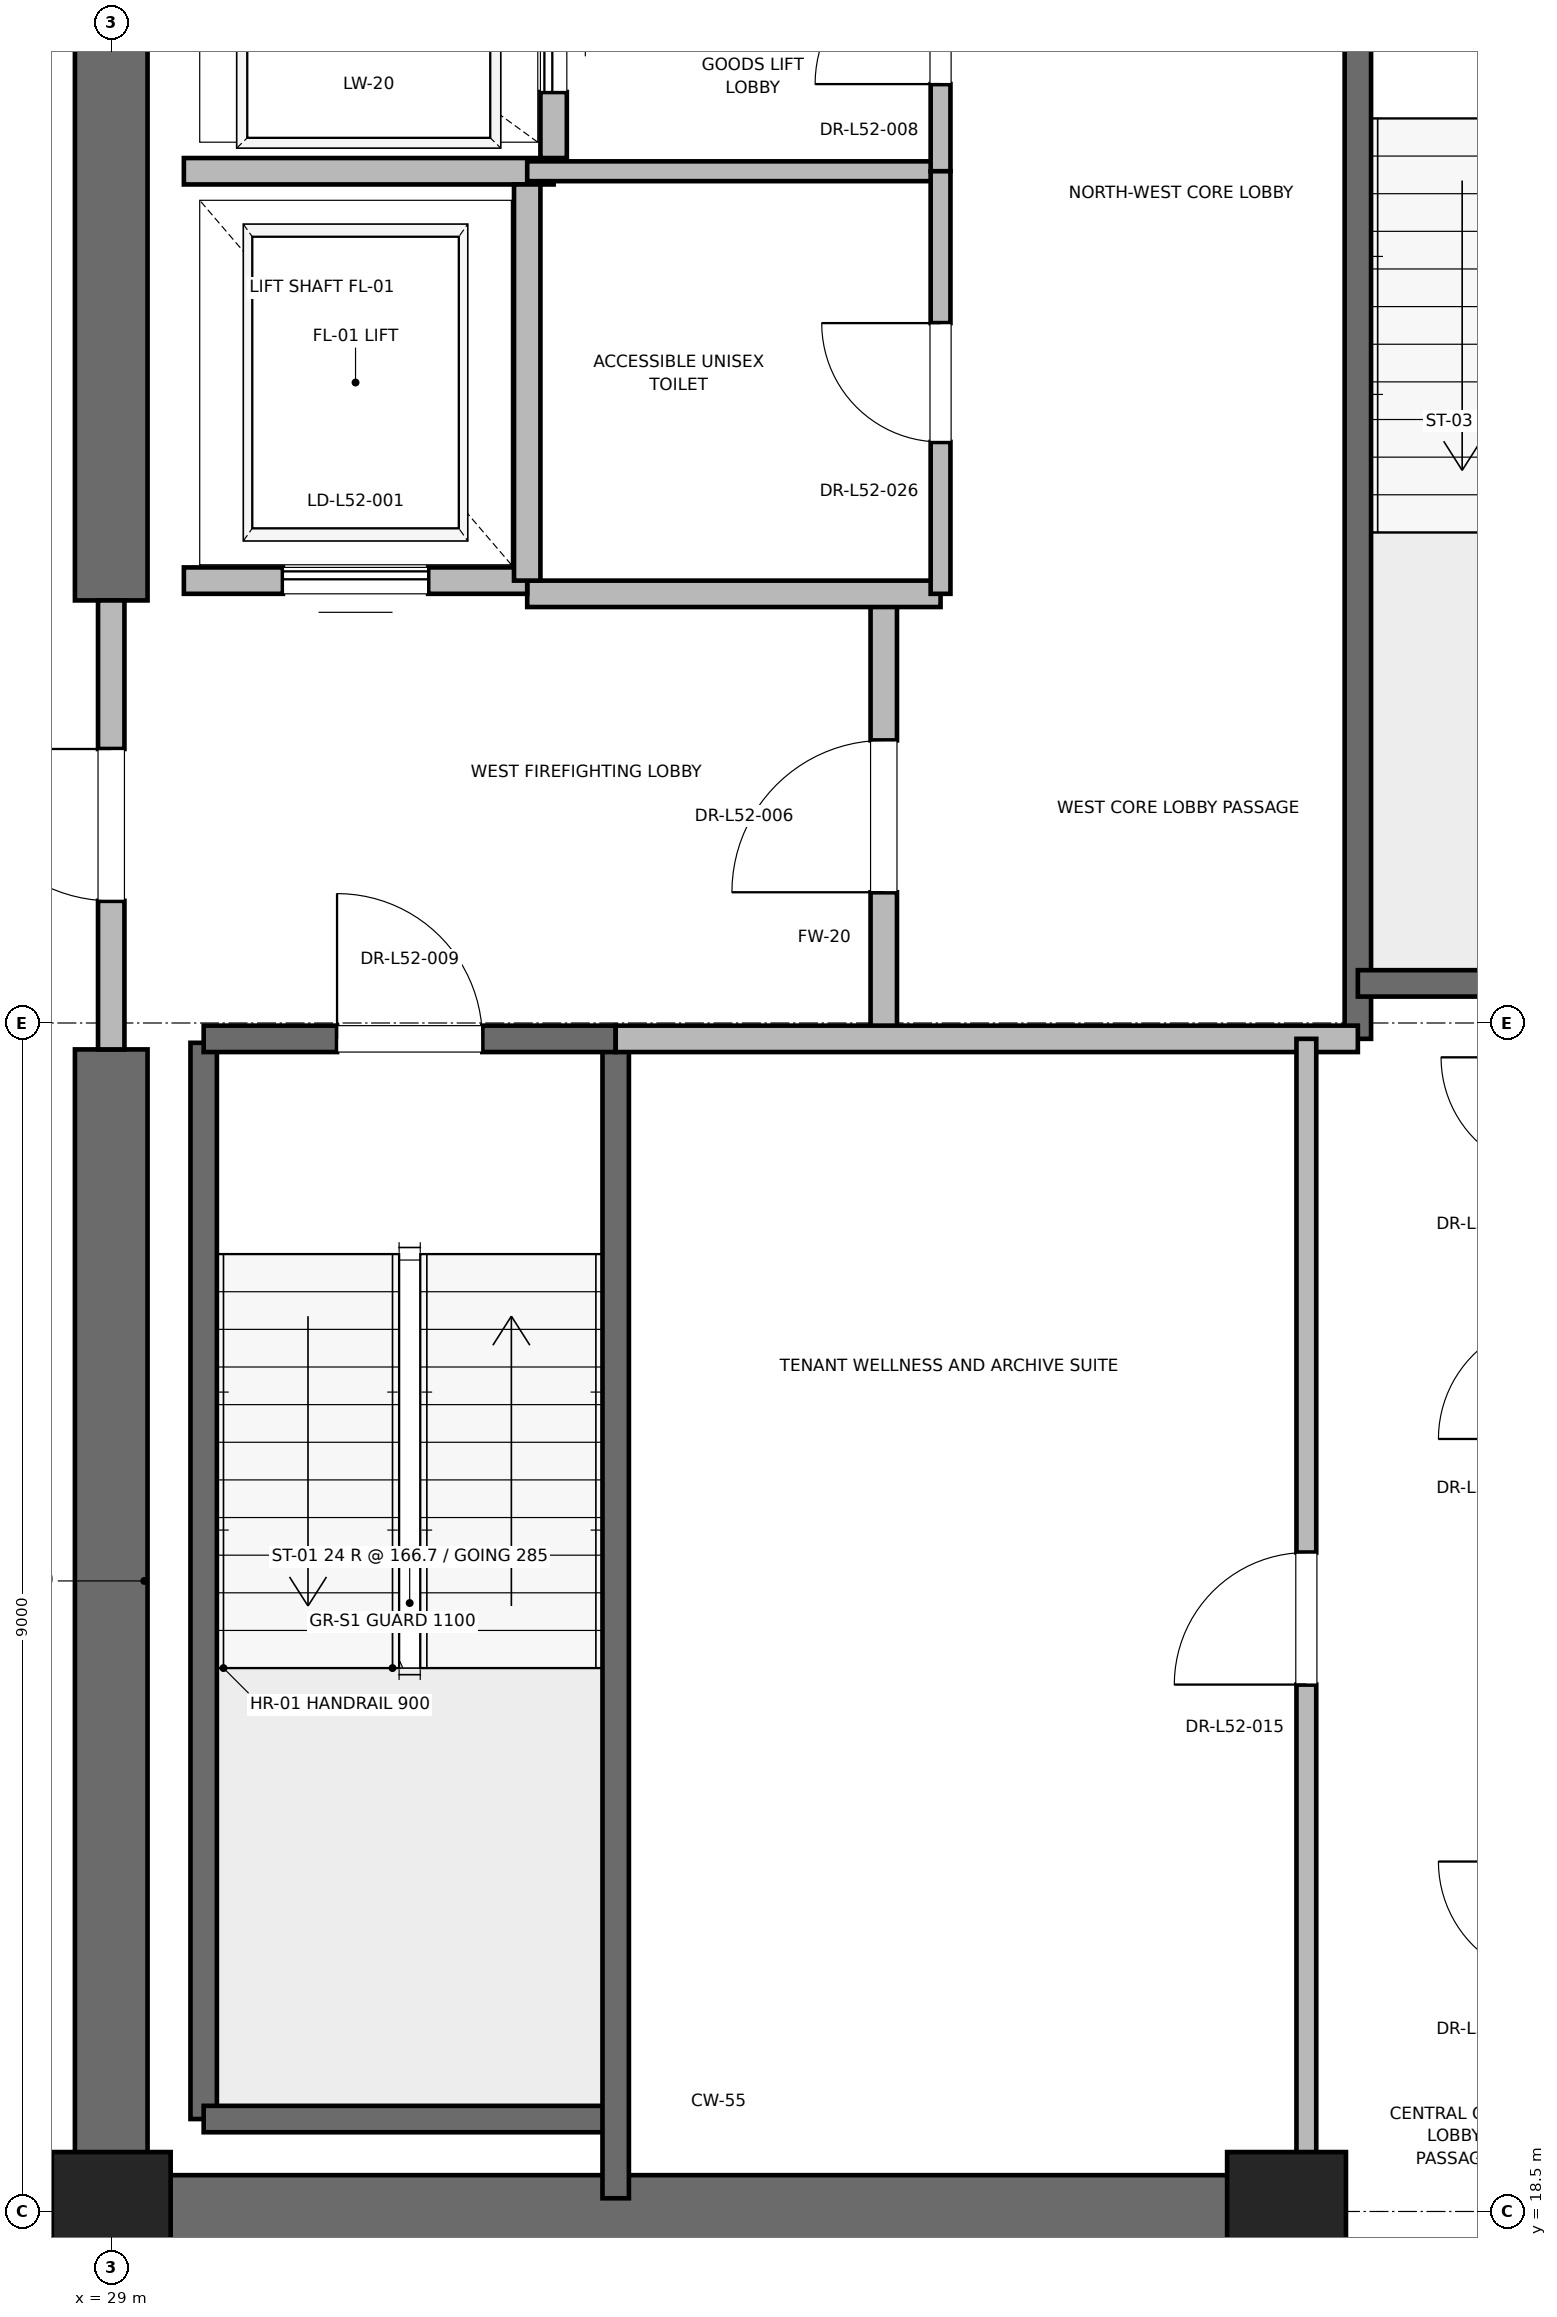
"""IFC4 building model, lengths in metres.
Left out: names, types, materials, properties, quantities, classifications, styles, units other than length and angle.
Written with IfcOpenShell. Run it as: python <this file> out.ifc"""

import sys

from ifc_helpers import new_model, si_unit, direction, frame, frame_2d, origin, origin_2d, place, context, subcontext, project, spatial, rectangle, extrude, element, fill, save


model = new_model("IFC4")
c1 = context("Model", 3, precision=1e-05, world=origin(), true_north=direction((0.0, 1.0)))
c2 = subcontext(c1, "Body", "Model", "MODEL_VIEW")
j1 = project(units=[si_unit("LENGTHUNIT", "METRE"), si_unit("PLANEANGLEUNIT", "RADIAN")], contexts=[c1])
p1 = place(None, origin())
s1 = spatial("IfcSite", under=j1, at=p1, CompositionType="ELEMENT")
p2 = place(p1, origin())
s2 = spatial("IfcBuilding", under=s1, at=p2, CompositionType="ELEMENT")
p3 = place(p2, frame((0.0, 0.0, 225.2)))
s3 = spatial("IfcBuildingStorey", under=s2, at=p3, CompositionType="ELEMENT", Elevation=225.2)
for number, where, z_axis, x_axis in (
    (1, (29.0, 18.5, 0.0), (0.0, 0.0, 1.0), (1.0, 0.0, 0.0)),
    (2, (37.9, 18.5, 0.0), (0.0, 0.0, 1.0), (1.0, 0.0, 0.0)),
):
    element("IfcColumn", number, at=place(p3, frame(where, z_axis=z_axis, x_axis=x_axis)), inside=s3, PredefinedType="PILASTER", context=c2, shape_type="SweptSolid", body=[
        extrude(rectangle(XDim=0.9, YDim=0.9, at=origin_2d()), origin(), (0.0, 0.0, 1.0), 4.0),
    ])
p4 = place(p3, frame((29.0, 18.5, 0.0), z_axis=(0.0, 0.0, 1.0), x_axis=(1.0, 0.0, 0.0)))
e3 = element("IfcWall", 3, at=p4, inside=s3, PredefinedType="SHEAR", context=c2, shape_type="SweptSolid", body=[
    extrude(rectangle(XDim=9.2, YDim=0.55, at=frame_2d((4.6, 0.0))), origin(), (0.0, 0.0, 1.0), 3.775),
])
p5 = place(p3, frame((29.0, 18.5, 0.0), z_axis=(0.0, 0.0, 1.0), x_axis=(0.0, 1.0, 0.0)))
e4 = element("IfcWall", 4, at=p5, inside=s3, PredefinedType="SHEAR", context=c2, shape_type="SweptSolid", body=[
    extrude(rectangle(XDim=8.8, YDim=0.55, at=frame_2d((4.4, 0.0))), origin(), (0.0, 0.0, 1.0), 3.775),
])
p6 = place(p3, frame((29.0, 30.7, 0.0), z_axis=(0.0, 0.0, 1.0), x_axis=(0.0, 1.0, 0.0)))
e5 = element("IfcWall", 5, at=p6, inside=s3, PredefinedType="SHEAR", context=c2, shape_type="SweptSolid", body=[
    extrude(rectangle(XDim=5.8, YDim=0.55, at=frame_2d((2.9, 0.0))), origin(), (0.0, 0.0, 1.0), 3.775),
])
p7 = place(p3, frame((29.7, 19.2, 0.0), z_axis=(0.0, 0.0, 1.0), x_axis=(0.0, 1.0, 0.0)))
e6 = element("IfcWall", 6, at=p7, inside=s3, PredefinedType="SOLIDWALL", context=c2, shape_type="SweptSolid", body=[
    extrude(rectangle(XDim=8.15, YDim=0.2, at=frame_2d((4.075, 0.0))), origin(), (0.0, 0.0, 1.0), 3.775),
])
p8 = place(p3, frame((29.7, 19.2, 0.0), z_axis=(0.0, 0.0, 1.0), x_axis=(1.0, 0.0, 0.0)))
e7 = element("IfcWall", 7, at=p8, inside=s3, PredefinedType="SOLIDWALL", context=c2, shape_type="SweptSolid", body=[
    extrude(rectangle(XDim=3.12, YDim=0.2, at=frame_2d((1.56, 0.0))), origin(), (0.0, 0.0, 1.0), 3.775),
])
p9 = place(p3, frame((32.82, 18.6, 0.0), z_axis=(0.0, 0.0, 1.0), x_axis=(0.0, 1.0, 0.0)))
e8 = element("IfcWall", 8, at=p9, inside=s3, PredefinedType="SOLIDWALL", context=c2, shape_type="SweptSolid", body=[
    extrude(rectangle(XDim=8.78, YDim=0.2, at=frame_2d((4.39, 0.0))), origin(), (0.0, 0.0, 1.0), 3.775),
])
p10 = place(p3, frame((29.7, 27.38, 0.0), z_axis=(0.0, 0.0, 1.0), x_axis=(1.0, 0.0, 0.0)))
e9 = element("IfcWall", 9, at=p10, inside=s3, PredefinedType="SOLIDWALL", context=c2, shape_type="SweptSolid", body=[
    extrude(rectangle(XDim=3.12, YDim=0.2, at=frame_2d((1.56, 0.0))), origin(), (0.0, 0.0, 1.0), 3.775),
])
p11 = place(p10, frame((1.01, 0.0, 0.0)))
e10 = element("IfcOpeningElement", 10, at=p11, cuts=e9, PredefinedType="OPENING", context=c2, shape_type="SweptSolid", body=[
    extrude(rectangle(XDim=1.1, YDim=2.15, at=frame_2d((0.55, 1.075))), frame((0.0, 0.1, 0.0), z_axis=(0.0, -1.0, 0.0), x_axis=(1.0, 0.0, 0.0)), (0.0, 0.0, 1.0), 0.2),
])
p12 = place(p3, frame((38.44, 27.38, 0.0), z_axis=(0.0, 0.0, 1.0), x_axis=(0.0, 1.0, 0.0)))
e11 = element("IfcWall", 11, at=p12, inside=s3, PredefinedType="SOLIDWALL", context=c2, shape_type="SweptSolid", body=[
    extrude(rectangle(XDim=8.87, YDim=0.2, at=frame_2d((4.435, 0.0))), origin(), (0.0, 0.0, 1.0), 3.775),
])
p13 = place(p3, frame((38.44, 27.8, 0.0), z_axis=(0.0, 0.0, 1.0), x_axis=(1.0, 0.0, 0.0)))
e12 = element("IfcWall", 12, at=p13, inside=s3, PredefinedType="SOLIDWALL", context=c2, shape_type="SweptSolid", body=[
    extrude(rectangle(XDim=3.32, YDim=0.2, at=frame_2d((1.66, 0.0))), origin(), (0.0, 0.0, 1.0), 3.775),
])
p14 = place(p3, frame((34.85, 27.38, 0.0), z_axis=(0.0, 0.0, 1.0), x_axis=(0.0, 1.0, 0.0)))
e13 = element("IfcWall", 13, at=p14, inside=s3, PredefinedType="PARTITIONING", context=c2, shape_type="SweptSolid", body=[
    extrude(rectangle(XDim=3.37, YDim=0.2, at=frame_2d((1.685, 0.0))), origin(), (0.0, 0.0, 1.0), 3.775),
])
p15 = place(p14, frame((1.11, 0.0, 0.0)))
e14 = element("IfcOpeningElement", 14, at=p15, cuts=e13, PredefinedType="OPENING", context=c2, shape_type="SweptSolid", body=[
    extrude(rectangle(XDim=1.15, YDim=2.2, at=frame_2d((0.575, 1.1))), frame((0.0, 0.1, 0.0), z_axis=(0.0, -1.0, 0.0), x_axis=(1.0, 0.0, 0.0)), (0.0, 0.0, 1.0), 0.2),
])
p16 = place(p3, frame((29.0, 27.3, 0.0), z_axis=(0.0, 0.0, 1.0), x_axis=(0.0, 1.0, 0.0)))
e15 = element("IfcWall", 15, at=p16, inside=s3, PredefinedType="PARTITIONING", context=c2, shape_type="SweptSolid", body=[
    extrude(rectangle(XDim=3.4, YDim=0.2, at=frame_2d((1.7, 0.0))), origin(), (0.0, 0.0, 1.0), 2.755),
])
p17 = place(p16, frame((1.125, 0.0, 0.0)))
e16 = element("IfcOpeningElement", 16, at=p17, cuts=e15, PredefinedType="OPENING", context=c2, shape_type="SweptSolid", body=[
    extrude(rectangle(XDim=1.15, YDim=2.2, at=frame_2d((0.575, 1.1))), frame((0.0, 0.1, 0.0), z_axis=(0.0, -1.0, 0.0), x_axis=(1.0, 0.0, 0.0)), (0.0, 0.0, 1.0), 0.2),
])
p18 = place(p3, frame((32.82, 27.38, 0.0), z_axis=(0.0, 0.0, 1.0), x_axis=(1.0, 0.0, 0.0)))
e17 = element("IfcWall", 17, at=p18, inside=s3, PredefinedType="PARTITIONING", context=c2, shape_type="SweptSolid", body=[
    extrude(rectangle(XDim=5.62, YDim=0.2, at=frame_2d((2.81, 0.0))), origin(), (0.0, 0.0, 1.0), 3.775),
])
p19 = place(p3, frame((32.15, 30.75, 0.0), z_axis=(0.0, 0.0, 1.0), x_axis=(1.0, 0.0, 0.0)))
e18 = element("IfcWall", 18, at=p19, inside=s3, PredefinedType="PARTITIONING", context=c2, shape_type="SweptSolid", body=[
    extrude(rectangle(XDim=3.13, YDim=0.2, at=frame_2d((1.565, 0.0))), origin(), (0.0, 0.0, 1.0), 3.775),
])
p20 = place(p3, frame((29.55, 30.85, 0.0), z_axis=(0.0, 0.0, 1.0), x_axis=(1.0, 0.0, 0.0)))
e19 = element("IfcWall", 19, at=p20, inside=s3, PredefinedType="SOLIDWALL", context=c2, shape_type="SweptSolid", body=[
    extrude(rectangle(XDim=2.6, YDim=0.2, at=frame_2d((1.3, 0.0))), origin(), (0.0, 0.0, 1.0), 2.755),
])
p21 = place(p20, frame((0.75, 0.0, 0.0)))
e20 = element("IfcOpeningElement", 20, at=p21, cuts=e19, PredefinedType="OPENING", context=c2, shape_type="SweptSolid", body=[
    extrude(rectangle(XDim=1.1, YDim=2.2, at=frame_2d((0.55, 1.1))), frame((0.0, 0.1, 0.0), z_axis=(0.0, -1.0, 0.0), x_axis=(1.0, 0.0, 0.0)), (0.0, 0.0, 1.0), 0.2),
])
p22 = place(p3, frame((29.55, 33.95, 0.0), z_axis=(0.0, 0.0, 1.0), x_axis=(1.0, 0.0, 0.0)))
e21 = element("IfcWall", 21, at=p22, inside=s3, PredefinedType="SOLIDWALL", context=c2, shape_type="SweptSolid", body=[
    extrude(rectangle(XDim=2.8, YDim=0.2, at=frame_2d((1.4, 0.0))), origin(), (0.0, 0.0, 1.0), 3.775),
])
p23 = place(p3, frame((32.15, 30.85, 0.0), z_axis=(0.0, 0.0, 1.0), x_axis=(0.0, 1.0, 0.0)))
e22 = element("IfcWall", 22, at=p23, inside=s3, PredefinedType="SOLIDWALL", context=c2, shape_type="SweptSolid", body=[
    extrude(rectangle(XDim=3.0, YDim=0.2, at=frame_2d((1.5, 0.0))), origin(), (0.0, 0.0, 1.0), 3.775),
])
p24 = place(p3, frame((32.35, 34.05, 0.0), z_axis=(0.0, 0.0, 1.0), x_axis=(0.0, 1.0, 0.0)))
e23 = element("IfcWall", 23, at=p24, inside=s3, PredefinedType="SOLIDWALL", context=c2, shape_type="SweptSolid", body=[
    extrude(rectangle(XDim=2.1, YDim=0.2, at=frame_2d((1.05, 0.0))), origin(), (0.0, 0.0, 1.0), 3.775),
])
p25 = place(p24, frame((0.5, 0.0, 0.0)))
e24 = element("IfcOpeningElement", 24, at=p25, cuts=e23, PredefinedType="OPENING", context=c2, shape_type="SweptSolid", body=[
    extrude(rectangle(XDim=1.1, YDim=2.2, at=frame_2d((0.55, 1.1))), frame((0.0, 0.1, 0.0), z_axis=(0.0, -1.0, 0.0), x_axis=(1.0, 0.0, 0.0)), (0.0, 0.0, 1.0), 0.2),
])
p26 = place(p3, frame((32.15, 33.95, 0.0), z_axis=(0.0, 0.0, 1.0), x_axis=(1.0, 0.0, 0.0)))
e25 = element("IfcWall", 25, at=p26, inside=s3, PredefinedType="PARTITIONING", context=c2, shape_type="SweptSolid", body=[
    extrude(rectangle(XDim=3.13, YDim=0.15, at=frame_2d((1.565, 0.0))), origin(), (0.0, 0.0, 1.0), 2.85),
])
p27 = place(p3, frame((35.28, 33.95, 0.0), z_axis=(0.0, 0.0, 1.0), x_axis=(0.0, 1.0, 0.0)))
e26 = element("IfcWall", 26, at=p27, inside=s3, PredefinedType="PARTITIONING", context=c2, shape_type="SweptSolid", body=[
    extrude(rectangle(XDim=2.27, YDim=0.15, at=frame_2d((1.135, 0.0))), origin(), (0.0, 0.0, 1.0), 2.755),
])
p28 = place(p27, frame((0.66, 0.0, 0.0)))
e27 = element("IfcOpeningElement", 27, at=p28, cuts=e26, PredefinedType="OPENING", context=c2, shape_type="SweptSolid", body=[
    extrude(rectangle(XDim=0.95, YDim=2.15, at=frame_2d((0.475, 1.075))), frame((0.0, 0.075, 0.0), z_axis=(0.0, -1.0, 0.0), x_axis=(1.0, 0.0, 0.0)), (0.0, 0.0, 1.0), 0.15),
])
p29 = place(p3, frame((35.28, 30.75, 0.0), z_axis=(0.0, 0.0, 1.0), x_axis=(0.0, 1.0, 0.0)))
e28 = element("IfcWall", 28, at=p29, inside=s3, PredefinedType="PARTITIONING", context=c2, shape_type="SweptSolid", body=[
    extrude(rectangle(XDim=3.2, YDim=0.15, at=frame_2d((1.6, 0.0))), origin(), (0.0, 0.0, 1.0), 2.85),
])
p30 = place(p29, frame((1.15, 0.0, 0.0)))
e29 = element("IfcOpeningElement", 29, at=p30, cuts=e28, PredefinedType="OPENING", context=c2, shape_type="SweptSolid", body=[
    extrude(rectangle(XDim=0.9, YDim=2.1, at=frame_2d((0.45, 1.05))), frame((0.0, 0.075, 0.0), z_axis=(0.0, -1.0, 0.0), x_axis=(1.0, 0.0, 0.0)), (0.0, 0.0, 1.0), 0.15),
])
p31 = place(p3, frame((38.05, 18.6, 0.0), z_axis=(0.0, 0.0, 1.0), x_axis=(0.0, 1.0, 0.0)))
e30 = element("IfcWall", 30, at=p31, inside=s3, PredefinedType="PARTITIONING", context=c2, shape_type="SweptSolid", body=[
    extrude(rectangle(XDim=8.78, YDim=0.15, at=frame_2d((4.39, 0.0))), origin(), (0.0, 0.0, 1.0), 2.755),
])
p32 = place(p31, frame((3.89, 0.0, 0.0)))
e31 = element("IfcOpeningElement", 31, at=p32, cuts=e30, PredefinedType="OPENING", context=c2, shape_type="SweptSolid", body=[
    extrude(rectangle(XDim=1.0, YDim=2.15, at=frame_2d((0.5, 1.075))), frame((0.0, 0.075, 0.0), z_axis=(0.0, -1.0, 0.0), x_axis=(1.0, 0.0, 0.0)), (0.0, 0.0, 1.0), 0.15),
])
p33 = place(p11, origin())
e32 = element("IfcDoor", 32, at=p33, inside=s3, OperationType="SINGLE_SWING_LEFT", PredefinedType="DOOR", context=c2, shape_type="SweptSolid", body=[
    extrude(rectangle(XDim=1.1, YDim=2.15, at=frame_2d((0.55, 1.075))), frame((0.0, 0.025, 0.0), z_axis=(0.0, -1.0, 0.0), x_axis=(1.0, 0.0, 0.0)), (0.0, 0.0, 1.0), 0.05),
])
fill(e10, e32)
p34 = place(p15, origin())
e33 = element("IfcDoor", 33, at=p34, inside=s3, OperationType="SINGLE_SWING_LEFT", PredefinedType="DOOR", context=c2, shape_type="SweptSolid", body=[
    extrude(rectangle(XDim=1.15, YDim=2.2, at=frame_2d((0.575, 1.1))), frame((0.0, 0.025, 0.0), z_axis=(0.0, -1.0, 0.0), x_axis=(1.0, 0.0, 0.0)), (0.0, 0.0, 1.0), 0.05),
])
fill(e14, e33)
p35 = place(p17, origin())
e34 = element("IfcDoor", 34, at=p35, inside=s3, OperationType="SINGLE_SWING_RIGHT", PredefinedType="DOOR", context=c2, shape_type="SweptSolid", body=[
    extrude(rectangle(XDim=1.15, YDim=2.2, at=frame_2d((0.575, 1.1))), frame((0.0, 0.025, 0.0), z_axis=(0.0, -1.0, 0.0), x_axis=(1.0, 0.0, 0.0)), (0.0, 0.0, 1.0), 0.05),
])
fill(e16, e34)
p36 = place(p21, origin())
e35 = element("IfcDoor", 35, at=p36, inside=s3, OperationType="SLIDING_TO_RIGHT", PredefinedType="DOOR", context=c2, shape_type="SweptSolid", body=[
    extrude(rectangle(XDim=1.1, YDim=2.2, at=frame_2d((0.55, 1.1))), frame((0.0, 0.025, 0.0), z_axis=(0.0, -1.0, 0.0), x_axis=(1.0, 0.0, 0.0)), (0.0, 0.0, 1.0), 0.05),
])
fill(e20, e35)
p37 = place(p25, origin())
e36 = element("IfcDoor", 36, at=p37, inside=s3, OperationType="SLIDING_TO_RIGHT", PredefinedType="DOOR", context=c2, shape_type="SweptSolid", body=[
    extrude(rectangle(XDim=1.1, YDim=2.2, at=frame_2d((0.55, 1.1))), frame((0.0, 0.025, 0.0), z_axis=(0.0, -1.0, 0.0), x_axis=(1.0, 0.0, 0.0)), (0.0, 0.0, 1.0), 0.05),
])
fill(e24, e36)
p38 = place(p28, origin())
e37 = element("IfcDoor", 37, at=p38, inside=s3, OperationType="SINGLE_SWING_LEFT", PredefinedType="DOOR", context=c2, shape_type="SweptSolid", body=[
    extrude(rectangle(XDim=0.95, YDim=2.15, at=frame_2d((0.475, 1.075))), frame((0.0, 0.025, 0.0), z_axis=(0.0, -1.0, 0.0), x_axis=(1.0, 0.0, 0.0)), (0.0, 0.0, 1.0), 0.05),
])
fill(e27, e37)
p39 = place(p30, origin())
e38 = element("IfcDoor", 38, at=p39, inside=s3, OperationType="SINGLE_SWING_RIGHT", PredefinedType="DOOR", context=c2, shape_type="SweptSolid", body=[
    extrude(rectangle(XDim=0.9, YDim=2.1, at=frame_2d((0.45, 1.05))), frame((0.0, 0.025, 0.0), z_axis=(0.0, -1.0, 0.0), x_axis=(1.0, 0.0, 0.0)), (0.0, 0.0, 1.0), 0.05),
])
fill(e29, e38)
p40 = place(p32, origin())
e39 = element("IfcDoor", 39, at=p40, inside=s3, OperationType="SINGLE_SWING_LEFT", PredefinedType="DOOR", context=c2, shape_type="SweptSolid", body=[
    extrude(rectangle(XDim=1.0, YDim=2.15, at=frame_2d((0.5, 1.075))), frame((0.0, 0.025, 0.0), z_axis=(0.0, -1.0, 0.0), x_axis=(1.0, 0.0, 0.0)), (0.0, 0.0, 1.0), 0.05),
])
fill(e31, e39)
save(model, sys.argv[1])
